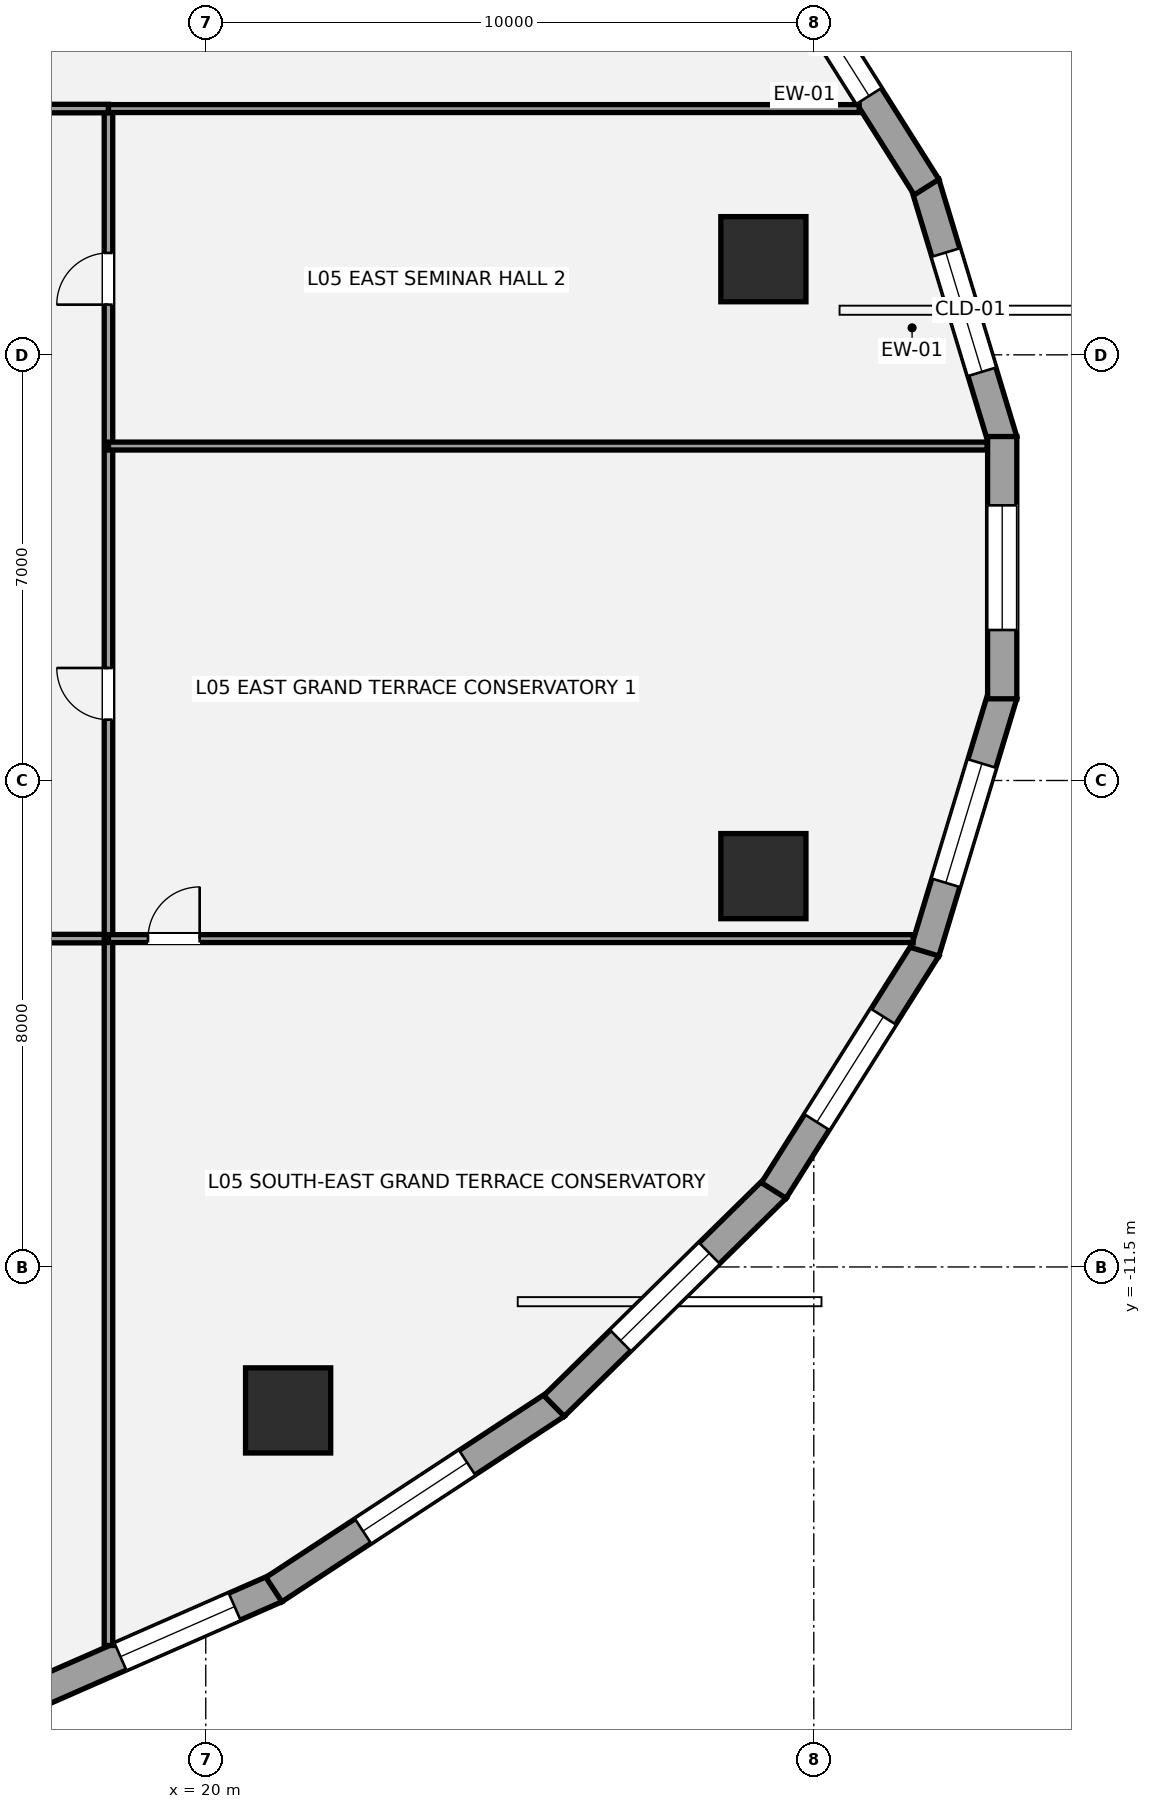
"""IFC4 building model, lengths in metres.
Left out: names, types, materials, properties, quantities, classifications, styles, units other than length and angle.
Written with IfcOpenShell. Run it as: python <this file> out.ifc"""

import sys

from ifc_helpers import new_model, si_unit, direction, frame, frame_2d, origin, origin_2d, place, context, subcontext, project, spatial, rectangle, hollow_circle, extrude, element, fill, save


model = new_model("IFC4")
c1 = context("Model", 3, precision=1e-05, world=origin(), true_north=direction((0.0, 1.0)))
c2 = subcontext(c1, "Body", "Model", "MODEL_VIEW")
j1 = project(units=[si_unit("LENGTHUNIT", "METRE"), si_unit("PLANEANGLEUNIT", "RADIAN")], contexts=[c1])
p1 = place(None, origin())
s1 = spatial("IfcSite", under=j1, at=p1, CompositionType="ELEMENT")
p2 = place(p1, origin())
s2 = spatial("IfcBuilding", under=s1, at=p2, CompositionType="ELEMENT")
p3 = place(p2, frame((0.0, 0.0, 22.8)))
s3 = spatial("IfcBuildingStorey", under=s2, at=p3, CompositionType="ELEMENT", Elevation=22.8)
for number, where, z_axis, x_axis in (
    (1, (29.171, 5.073, 0.0), (0.0, 0.0, 1.0), (1.0, 0.0, 0.0)),
    (2, (21.354, -13.859, 0.0), (0.0, 0.0, 1.0), (1.0, 0.0, 0.0)),
    (3, (29.171, -5.073, 0.0), (0.0, 0.0, 1.0), (1.0, 0.0, 0.0)),
):
    element("IfcColumn", number, at=place(p3, frame(where, z_axis=z_axis, x_axis=x_axis)), inside=s3, PredefinedType="USERDEFINED", context=c2, shape_type="SweptSolid", body=[
        extrude(hollow_circle(Radius=0.7, WallThickness=0.05, at=origin_2d()), origin(), (0.0, 0.0, 1.0), 4.13),
    ])
p4 = place(p3, frame((31.828, 6.317, 0.0), z_axis=(0.0, 0.0, 1.0), x_axis=(0.289855603468, -0.957070388811, 0.0)))
e4 = element("IfcWall", 4, at=p4, inside=s3, PredefinedType="STANDARD", context=c2, shape_type="SweptSolid", body=[
    extrude(rectangle(XDim=4.419, YDim=0.48, at=frame_2d((2.21, 0.0))), origin(), (0.0, 0.0, 1.0), 3.033),
])
p5 = place(p4, frame((1.185, 0.0, 0.72)))
e5 = element("IfcOpeningElement", 5, at=p5, cuts=e4, PredefinedType="OPENING", context=c2, shape_type="SweptSolid", body=[
    extrude(rectangle(XDim=2.05, YDim=1.8, at=frame_2d((1.025, 0.9))), frame((0.0, 0.25, 0.0), z_axis=(0.0, -1.0, 0.0), x_axis=(1.0, 0.0, 0.0)), (0.0, 0.0, 1.0), 0.5),
])
p6 = place(p3, frame((29.341, 10.243, 0.0), z_axis=(0.0, 0.0, 1.0), x_axis=(0.53349762721, -0.845801561693, 0.0)))
e6 = element("IfcWall", 6, at=p6, inside=s3, PredefinedType="STANDARD", context=c2, shape_type="SweptSolid", body=[
    extrude(rectangle(XDim=4.711, YDim=0.48, at=frame_2d((2.355, 0.0))), origin(), (0.0, 0.0, 1.0), 3.033),
])
p7 = place(p6, frame((0.888, 0.0, 0.72)))
e7 = element("IfcOpeningElement", 7, at=p7, cuts=e6, PredefinedType="OPENING", context=c2, shape_type="SweptSolid", body=[
    extrude(rectangle(XDim=2.05, YDim=1.8, at=frame_2d((1.025, 0.9))), frame((0.0, 0.25, 0.0), z_axis=(0.0, -1.0, 0.0), x_axis=(1.0, 0.0, 0.0)), (0.0, 0.0, 1.0), 0.5),
])
p8 = place(p3, frame((21.156, -16.786, 0.0), z_axis=(0.0, 0.0, 1.0), x_axis=(-0.91570760638, -0.401845218484, 0.0)))
e8 = element("IfcWall", 8, at=p8, inside=s3, PredefinedType="STANDARD", context=c2, shape_type="SweptSolid", body=[
    extrude(rectangle(XDim=5.963, YDim=0.48, at=frame_2d((2.981, 0.0))), origin(), (0.0, 0.0, 1.0), 3.033),
])
p9 = place(p8, frame((0.744, 0.0, 0.72)))
e9 = element("IfcOpeningElement", 9, at=p9, cuts=e8, PredefinedType="OPENING", context=c2, shape_type="SweptSolid", body=[
    extrude(rectangle(XDim=2.05, YDim=1.8, at=frame_2d((1.025, 0.9))), frame((0.0, 0.25, 0.0), z_axis=(0.0, -1.0, 0.0), x_axis=(1.0, 0.0, 0.0)), (0.0, 0.0, 1.0), 0.5),
])
p10 = place(p3, frame((25.764, -13.756, 0.0), z_axis=(0.0, 0.0, 1.0), x_axis=(-0.835863918172, -0.548936708827, 0.0)))
e10 = element("IfcWall", 10, at=p10, inside=s3, PredefinedType="STANDARD", context=c2, shape_type="SweptSolid", body=[
    extrude(rectangle(XDim=5.555, YDim=0.48, at=frame_2d((2.778, 0.0))), origin(), (0.0, 0.0, 1.0), 3.033),
])
p11 = place(p10, frame((1.753, 0.0, 0.72)))
e11 = element("IfcOpeningElement", 11, at=p11, cuts=e10, PredefinedType="OPENING", context=c2, shape_type="SweptSolid", body=[
    extrude(rectangle(XDim=2.05, YDim=1.8, at=frame_2d((1.025, 0.9))), frame((0.0, 0.25, 0.0), z_axis=(0.0, -1.0, 0.0), x_axis=(1.0, 0.0, 0.0)), (0.0, 0.0, 1.0), 0.5),
])
p12 = place(p3, frame((29.376, -10.199, 0.0), z_axis=(0.0, 0.0, 1.0), x_axis=(-0.713189080178, -0.700971708355, 0.0)))
e12 = element("IfcWall", 12, at=p12, inside=s3, PredefinedType="STANDARD", context=c2, shape_type="SweptSolid", body=[
    extrude(rectangle(XDim=5.116, YDim=0.48, at=frame_2d((2.558, 0.0))), origin(), (0.0, 0.0, 1.0), 3.033),
])
p13 = place(p12, frame((1.533, 0.0, 0.72)))
e13 = element("IfcOpeningElement", 13, at=p13, cuts=e12, PredefinedType="OPENING", context=c2, shape_type="SweptSolid", body=[
    extrude(rectangle(XDim=2.05, YDim=1.8, at=frame_2d((1.025, 0.9))), frame((0.0, 0.25, 0.0), z_axis=(0.0, -1.0, 0.0), x_axis=(1.0, 0.0, 0.0)), (0.0, 0.0, 1.0), 0.5),
])
p14 = place(p3, frame((31.854, -6.258, 0.0), z_axis=(0.0, 0.0, 1.0), x_axis=(-0.53349762721, -0.845801561693, 0.0)))
e14 = element("IfcWall", 14, at=p14, inside=s3, PredefinedType="STANDARD", context=c2, shape_type="SweptSolid", body=[
    extrude(rectangle(XDim=4.711, YDim=0.48, at=frame_2d((2.355, 0.0))), origin(), (0.0, 0.0, 1.0), 3.033),
])
p15 = place(p14, frame((1.33, 0.0, 0.72)))
e15 = element("IfcOpeningElement", 15, at=p15, cuts=e14, PredefinedType="OPENING", context=c2, shape_type="SweptSolid", body=[
    extrude(rectangle(XDim=2.05, YDim=1.8, at=frame_2d((1.025, 0.9))), frame((0.0, 0.25, 0.0), z_axis=(0.0, -1.0, 0.0), x_axis=(1.0, 0.0, 0.0)), (0.0, 0.0, 1.0), 0.5),
])
p16 = place(p3, frame((33.109, -2.087, 0.0), z_axis=(0.0, 0.0, 1.0), x_axis=(-0.289855603468, -0.957070388811, 0.0)))
e16 = element("IfcWall", 16, at=p16, inside=s3, PredefinedType="STANDARD", context=c2, shape_type="SweptSolid", body=[
    extrude(rectangle(XDim=4.419, YDim=0.48, at=frame_2d((2.21, 0.0))), origin(), (0.0, 0.0, 1.0), 3.033),
])
p17 = place(p16, frame((1.185, 0.0, 0.72)))
e17 = element("IfcOpeningElement", 17, at=p17, cuts=e16, PredefinedType="OPENING", context=c2, shape_type="SweptSolid", body=[
    extrude(rectangle(XDim=2.05, YDim=1.8, at=frame_2d((1.025, 0.9))), frame((0.0, 0.25, 0.0), z_axis=(0.0, -1.0, 0.0), x_axis=(1.0, 0.0, 0.0)), (0.0, 0.0, 1.0), 0.5),
])
p18 = place(p3, frame((33.099, 2.156, 0.0), z_axis=(0.0, 0.0, 1.0), x_axis=(0.0, -1.0, 0.0)))
e18 = element("IfcWall", 18, at=p18, inside=s3, PredefinedType="STANDARD", context=c2, shape_type="SweptSolid", body=[
    extrude(rectangle(XDim=4.313, YDim=0.48, at=frame_2d((2.156, 0.0))), origin(), (0.0, 0.0, 1.0), 3.033),
])
p19 = place(p18, frame((1.131, 0.0, 0.72)))
e19 = element("IfcOpeningElement", 19, at=p19, cuts=e18, PredefinedType="OPENING", context=c2, shape_type="SweptSolid", body=[
    extrude(rectangle(XDim=2.05, YDim=1.8, at=frame_2d((1.025, 0.9))), frame((0.0, 0.25, 0.0), z_axis=(0.0, -1.0, 0.0), x_axis=(1.0, 0.0, 0.0)), (0.0, 0.0, 1.0), 0.5),
])
p20 = place(p3, frame((-16.0, -6.1, 0.0), z_axis=(0.0, 0.0, 1.0), x_axis=(1.0, 0.0, 0.0)))
e20 = element("IfcWall", 20, at=p20, inside=s3, PredefinedType="PARTITIONING", context=c2, shape_type="SweptSolid", body=[
    extrude(rectangle(XDim=34.4, YDim=0.14, at=frame_2d((17.2, 0.0))), origin(), (0.0, 0.0, 1.0), 2.09),
])
p21 = place(p20, frame((5.5, 0.0, 0.0)))
e21 = element("IfcOpeningElement", 21, at=p21, cuts=e20, PredefinedType="OPENING", context=c2, shape_type="SweptSolid", body=[
    extrude(rectangle(XDim=0.85, YDim=2.0, at=frame_2d((0.425, 1.0))), frame((0.0, 0.08, 0.0), z_axis=(0.0, -1.0, 0.0), x_axis=(1.0, 0.0, 0.0)), (0.0, 0.0, 1.0), 0.16),
])
p22 = place(p20, frame((17.9, 0.0, 0.0)))
e22 = element("IfcOpeningElement", 22, at=p22, cuts=e20, PredefinedType="OPENING", context=c2, shape_type="SweptSolid", body=[
    extrude(rectangle(XDim=0.85, YDim=2.0, at=frame_2d((0.425, 1.0))), frame((0.0, 0.08, 0.0), z_axis=(0.0, -1.0, 0.0), x_axis=(1.0, 0.0, 0.0)), (0.0, 0.0, 1.0), 0.16),
])
p23 = place(p20, frame((28.85, 0.0, 0.0)))
e23 = element("IfcOpeningElement", 23, at=p23, cuts=e20, PredefinedType="OPENING", context=c2, shape_type="SweptSolid", body=[
    extrude(rectangle(XDim=0.85, YDim=2.0, at=frame_2d((0.425, 1.0))), frame((0.0, 0.08, 0.0), z_axis=(0.0, -1.0, 0.0), x_axis=(1.0, 0.0, 0.0)), (0.0, 0.0, 1.0), 0.16),
])
p24 = place(p3, frame((18.4, -17.725, 0.0), z_axis=(0.0, 0.0, 1.0), x_axis=(0.0, 1.0, 0.0)))
e24 = element("IfcWall", 24, at=p24, inside=s3, PredefinedType="PARTITIONING", context=c2, shape_type="SweptSolid", body=[
    extrude(rectangle(XDim=25.275, YDim=0.14, at=frame_2d((12.637, 0.0))), origin(), (0.0, 0.0, 1.0), 2.09),
])
p25 = place(p24, frame((15.225, 0.0, 0.0)))
e25 = element("IfcOpeningElement", 25, at=p25, cuts=e24, PredefinedType="OPENING", context=c2, shape_type="SweptSolid", body=[
    extrude(rectangle(XDim=0.85, YDim=2.0, at=frame_2d((0.425, 1.0))), frame((0.0, 0.08, 0.0), z_axis=(0.0, -1.0, 0.0), x_axis=(1.0, 0.0, 0.0)), (0.0, 0.0, 1.0), 0.16),
])
p26 = place(p24, frame((22.05, 0.0, 0.0)))
e26 = element("IfcOpeningElement", 26, at=p26, cuts=e24, PredefinedType="OPENING", context=c2, shape_type="SweptSolid", body=[
    extrude(rectangle(XDim=0.85, YDim=2.0, at=frame_2d((0.425, 1.0))), frame((0.0, 0.08, 0.0), z_axis=(0.0, -1.0, 0.0), x_axis=(1.0, 0.0, 0.0)), (0.0, 0.0, 1.0), 0.16),
])
p27 = place(p3, frame((14.05, 7.55, 0.0), z_axis=(0.0, 0.0, 1.0), x_axis=(1.0, 0.0, 0.0)))
e27 = element("IfcWall", 27, at=p27, inside=s3, PredefinedType="PARTITIONING", context=c2, shape_type="SweptSolid", body=[
    extrude(rectangle(XDim=4.35, YDim=0.14, at=frame_2d((2.175, 0.0))), origin(), (0.0, 0.0, 1.0), 3.9),
])
p28 = place(p27, frame((0.32, 0.0, 0.0)))
e28 = element("IfcOpeningElement", 28, at=p28, cuts=e27, PredefinedType="OPENING", context=c2, shape_type="SweptSolid", body=[
    extrude(rectangle(XDim=0.92, YDim=2.15, at=frame_2d((0.46, 1.075))), frame((0.0, 0.08, 0.0), z_axis=(0.0, -1.0, 0.0), x_axis=(1.0, 0.0, 0.0)), (0.0, 0.0, 1.0), 0.16),
])
p29 = place(p3, frame((18.4, 7.55, 0.0), z_axis=(0.0, 0.0, 1.0), x_axis=(1.0, 0.0, 0.0)))
e29 = element("IfcWall", 29, at=p29, inside=s3, PredefinedType="PARTITIONING", context=c2, shape_type="SweptSolid", body=[
    extrude(rectangle(XDim=12.347, YDim=0.13, at=frame_2d((6.173, 0.0))), origin(), (0.0, 0.0, 1.0), 2.09),
])
p30 = place(p3, frame((18.4, -6.1, 0.0), z_axis=(0.0, 0.0, 1.0), x_axis=(1.0, 0.0, 0.0)))
e30 = element("IfcWall", 30, at=p30, inside=s3, PredefinedType="PARTITIONING", context=c2, shape_type="SweptSolid", body=[
    extrude(rectangle(XDim=13.234, YDim=0.13, at=frame_2d((6.617, 0.0))), origin(), (0.0, 0.0, 1.0), 2.09),
])
p31 = place(p30, frame((0.65, 0.0, 0.0)))
e31 = element("IfcOpeningElement", 31, at=p31, cuts=e30, PredefinedType="OPENING", context=c2, shape_type="SweptSolid", body=[
    extrude(rectangle(XDim=0.85, YDim=2.0, at=frame_2d((0.425, 1.0))), frame((0.0, 0.075, 0.0), z_axis=(0.0, -1.0, 0.0), x_axis=(1.0, 0.0, 0.0)), (0.0, 0.0, 1.0), 0.15),
])
p32 = place(p3, frame((18.4, 2.0, 0.0), z_axis=(0.0, 0.0, 1.0), x_axis=(1.0, 0.0, 0.0)))
e32 = element("IfcWall", 32, at=p32, inside=s3, PredefinedType="PARTITIONING", context=c2, shape_type="SweptSolid", body=[
    extrude(rectangle(XDim=14.451, YDim=0.13, at=frame_2d((7.225, 0.0))), origin(), (0.0, 0.0, 1.0), 2.09),
])
p33 = place(p5, origin())
e33 = element("IfcWindow", 33, at=p33, inside=s3, PartitioningType="SINGLE_PANEL", PredefinedType="WINDOW", context=c2, shape_type="SweptSolid", body=[
    extrude(rectangle(XDim=2.05, YDim=1.8, at=frame_2d((1.025, 0.9))), frame((0.0, -0.01, 0.0), z_axis=(0.0, -1.0, 0.0), x_axis=(1.0, 0.0, 0.0)), (0.0, 0.0, 1.0), 0.06),
])
fill(e5, e33)
p34 = place(p7, origin())
e34 = element("IfcWindow", 34, at=p34, inside=s3, PartitioningType="SINGLE_PANEL", PredefinedType="WINDOW", context=c2, shape_type="SweptSolid", body=[
    extrude(rectangle(XDim=2.05, YDim=1.8, at=frame_2d((1.025, 0.9))), frame((0.0, -0.01, 0.0), z_axis=(0.0, -1.0, 0.0), x_axis=(1.0, 0.0, 0.0)), (0.0, 0.0, 1.0), 0.06),
])
fill(e7, e34)
p35 = place(p9, origin())
e35 = element("IfcWindow", 35, at=p35, inside=s3, PartitioningType="SINGLE_PANEL", PredefinedType="WINDOW", context=c2, shape_type="SweptSolid", body=[
    extrude(rectangle(XDim=2.05, YDim=1.8, at=frame_2d((1.025, 0.9))), frame((0.0, -0.01, 0.0), z_axis=(0.0, -1.0, 0.0), x_axis=(1.0, 0.0, 0.0)), (0.0, 0.0, 1.0), 0.06),
])
fill(e9, e35)
p36 = place(p11, origin())
e36 = element("IfcWindow", 36, at=p36, inside=s3, PartitioningType="SINGLE_PANEL", PredefinedType="WINDOW", context=c2, shape_type="SweptSolid", body=[
    extrude(rectangle(XDim=2.05, YDim=1.8, at=frame_2d((1.025, 0.9))), frame((0.0, -0.01, 0.0), z_axis=(0.0, -1.0, 0.0), x_axis=(1.0, 0.0, 0.0)), (0.0, 0.0, 1.0), 0.06),
])
fill(e11, e36)
p37 = place(p13, origin())
e37 = element("IfcWindow", 37, at=p37, inside=s3, PartitioningType="SINGLE_PANEL", PredefinedType="WINDOW", context=c2, shape_type="SweptSolid", body=[
    extrude(rectangle(XDim=2.05, YDim=1.8, at=frame_2d((1.025, 0.9))), frame((0.0, -0.01, 0.0), z_axis=(0.0, -1.0, 0.0), x_axis=(1.0, 0.0, 0.0)), (0.0, 0.0, 1.0), 0.06),
])
fill(e13, e37)
p38 = place(p15, origin())
e38 = element("IfcWindow", 38, at=p38, inside=s3, PartitioningType="SINGLE_PANEL", PredefinedType="WINDOW", context=c2, shape_type="SweptSolid", body=[
    extrude(rectangle(XDim=2.05, YDim=1.8, at=frame_2d((1.025, 0.9))), frame((0.0, -0.01, 0.0), z_axis=(0.0, -1.0, 0.0), x_axis=(1.0, 0.0, 0.0)), (0.0, 0.0, 1.0), 0.06),
])
fill(e15, e38)
p39 = place(p17, origin())
e39 = element("IfcWindow", 39, at=p39, inside=s3, PartitioningType="SINGLE_PANEL", PredefinedType="WINDOW", context=c2, shape_type="SweptSolid", body=[
    extrude(rectangle(XDim=2.05, YDim=1.8, at=frame_2d((1.025, 0.9))), frame((0.0, -0.01, 0.0), z_axis=(0.0, -1.0, 0.0), x_axis=(1.0, 0.0, 0.0)), (0.0, 0.0, 1.0), 0.06),
])
fill(e17, e39)
p40 = place(p19, origin())
e40 = element("IfcWindow", 40, at=p40, inside=s3, PartitioningType="SINGLE_PANEL", PredefinedType="WINDOW", context=c2, shape_type="SweptSolid", body=[
    extrude(rectangle(XDim=2.05, YDim=1.8, at=frame_2d((1.025, 0.9))), frame((0.0, -0.01, 0.0), z_axis=(0.0, -1.0, 0.0), x_axis=(1.0, 0.0, 0.0)), (0.0, 0.0, 1.0), 0.06),
])
fill(e19, e40)
p41 = place(p31, origin())
e41 = element("IfcDoor", 41, at=p41, inside=s3, OperationType="SINGLE_SWING_RIGHT", PredefinedType="DOOR", context=c2, shape_type="SweptSolid", body=[
    extrude(rectangle(XDim=0.85, YDim=2.0, at=frame_2d((0.425, 1.0))), frame((0.0, 0.025, 0.0), z_axis=(0.0, -1.0, 0.0), x_axis=(1.0, 0.0, 0.0)), (0.0, 0.0, 1.0), 0.05),
])
fill(e31, e41)
p42 = place(p25, origin())
e42 = element("IfcDoor", 42, at=p42, inside=s3, OperationType="SINGLE_SWING_RIGHT", PredefinedType="DOOR", context=c2, shape_type="SweptSolid", body=[
    extrude(rectangle(XDim=0.85, YDim=2.0, at=frame_2d((0.425, 1.0))), frame((0.0, 0.025, 0.0), z_axis=(0.0, -1.0, 0.0), x_axis=(1.0, 0.0, 0.0)), (0.0, 0.0, 1.0), 0.05),
])
fill(e25, e42)
p43 = place(p26, origin())
e43 = element("IfcDoor", 43, at=p43, inside=s3, OperationType="SINGLE_SWING_LEFT", PredefinedType="DOOR", context=c2, shape_type="SweptSolid", body=[
    extrude(rectangle(XDim=0.85, YDim=2.0, at=frame_2d((0.425, 1.0))), frame((0.0, 0.025, 0.0), z_axis=(0.0, -1.0, 0.0), x_axis=(1.0, 0.0, 0.0)), (0.0, 0.0, 1.0), 0.05),
])
fill(e26, e43)
save(model, sys.argv[1])
